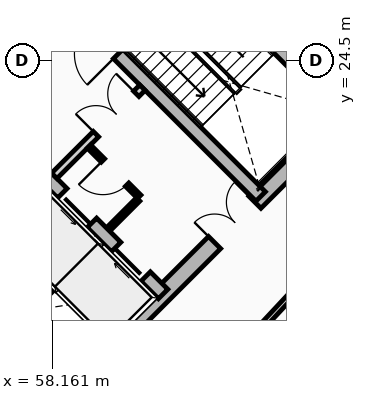
"""IFC4 building model, lengths in metres.
Left out: names, types, materials, properties, quantities, classifications, styles, units other than length and angle.
Written with IfcOpenShell. Run it as: python <this file> out.ifc"""

import sys

from ifc_helpers import new_model, si_unit, direction, frame, frame_2d, origin, place, context, subcontext, project, spatial, rectangle, extrude, source, transform, mapped, element, fill, save


model = new_model("IFC4")
c1 = context("Model", 3, precision=1e-05, world=origin(), true_north=direction((0.0, 1.0)))
c2 = subcontext(c1, "Body", "Model", "MODEL_VIEW")
j1 = project(units=[si_unit("LENGTHUNIT", "METRE"), si_unit("PLANEANGLEUNIT", "RADIAN")], contexts=[c1])
p1 = place(None, origin())
s1 = spatial("IfcSite", under=j1, at=p1, CompositionType="ELEMENT")
p2 = place(p1, origin())
s2 = spatial("IfcBuilding", under=s1, at=p2, CompositionType="ELEMENT")
p3 = place(p2, frame((0.0, 0.0, 125.44)))
s3 = spatial("IfcBuildingStorey", under=s2, at=p3, CompositionType="ELEMENT", Elevation=125.44)
for number, where, z_axis, x_axis in (
    (1, (58.737, 15.697, 0.0), (0.0, 0.0, 1.0), (-0.707, 0.707, 0.0)),
    (2, (66.303, 23.263, 0.0), (0.0, 0.0, 1.0), (-0.707, 0.707, 0.0)),
):
    element("IfcWall", number, at=place(p3, frame(where, z_axis=z_axis, x_axis=x_axis)), inside=s3, PredefinedType="SHEAR", context=c2, shape_type="SweptSolid", body=[
        extrude(rectangle(XDim=14.2, YDim=0.45, at=frame_2d((7.1, 0.0))), origin(), (0.0, 0.0, 1.0), 3.72),
    ])
p4 = place(p3, frame((58.578, 15.856, 0.0), z_axis=(0.0, 0.0, 1.0), x_axis=(0.707106781187, 0.707106781187, 0.0)))
e3 = element("IfcWall", 3, at=p4, inside=s3, PredefinedType="SHEAR", context=c2, shape_type="SweptSolid", body=[
    extrude(rectangle(XDim=10.7, YDim=0.45, at=frame_2d((5.35, 0.0))), origin(), (0.0, 0.0, 1.0), 3.72),
])
m1 = source(origin(), c2, "Body", "SweptSolid", [
    extrude(rectangle(XDim=1.5, YDim=2.02, at=frame_2d((0.75, 1.01))), frame((0.0, 0.235, 0.0), z_axis=(0.0, -1.0, 0.0), x_axis=(1.0, 0.0, 0.0)), (0.0, 0.0, 1.0), 0.47),
])
p5 = place(p4, frame((5.45, 0.0, 0.0)))
e4 = element("IfcOpeningElement", 4, at=p5, cuts=e3, PredefinedType="OPENING", context=c2, shape_type="MappedRepresentation", body=[
    mapped(m1, transform((0.0, 0.0, 0.0), x_axis=(1.0, 0.0, 0.0), y_axis=(0.0, 1.0, 0.0), z_axis=(0.0, 0.0, 1.0), scale=1.0)),
])
p6 = place(p3, frame((61.078, 18.355, 0.0), z_axis=(0.0, 0.0, 1.0), x_axis=(-0.707106781187, 0.707106781187, 0.0)))
e5 = element("IfcWall", 5, at=p6, inside=s3, PredefinedType="SHEAR", context=c2, shape_type="SweptSolid", body=[
    extrude(rectangle(XDim=13.75, YDim=0.35, at=frame_2d((6.875, 0.0))), origin(), (0.0, 0.0, 1.0), 3.72),
])
m2 = source(origin(), c2, "Body", "SweptSolid", [
    extrude(rectangle(XDim=1.1, YDim=2.015, at=frame_2d((0.55, 1.007))), frame((0.0, 0.185, 0.0), z_axis=(0.0, -1.0, 0.0), x_axis=(1.0, 0.0, 0.0)), (0.0, 0.0, 1.0), 0.37),
])
p7 = place(p6, frame((4.875, 0.0, 0.0)))
e6 = element("IfcOpeningElement", 6, at=p7, cuts=e5, PredefinedType="OPENING", context=c2, shape_type="MappedRepresentation", body=[
    mapped(m2, transform((0.0, 0.0, 0.0), x_axis=(1.0, 0.0, 0.0), y_axis=(0.0, 1.0, 0.0), z_axis=(0.0, 0.0, 1.0), scale=1.0)),
])
p8 = place(p6, frame((0.65, 0.0, 0.0)))
e7 = element("IfcOpeningElement", 7, at=p8, cuts=e5, PredefinedType="OPENING", context=c2, shape_type="MappedRepresentation", body=[
    mapped(m2, transform((0.0, 0.0, 0.0), x_axis=(1.0, 0.0, 0.0), y_axis=(0.0, 1.0, 0.0), z_axis=(0.0, 0.0, 1.0), scale=1.0)),
])
p9 = place(p6, frame((2.65, 0.0, 0.0)))
e8 = element("IfcOpeningElement", 8, at=p9, cuts=e5, PredefinedType="OPENING", context=c2, shape_type="MappedRepresentation", body=[
    mapped(m2, transform((0.0, 0.0, 0.0), x_axis=(1.0, 0.0, 0.0), y_axis=(0.0, 1.0, 0.0), z_axis=(0.0, 0.0, 1.0), scale=1.0)),
])
m3 = source(origin(), c2, "Body", "SweptSolid", [
    extrude(rectangle(XDim=1.15, YDim=2.02, at=frame_2d((0.575, 1.01))), frame((0.0, 0.185, 0.0), z_axis=(0.0, -1.0, 0.0), x_axis=(1.0, 0.0, 0.0)), (0.0, 0.0, 1.0), 0.37),
])
p10 = place(p6, frame((7.295, 0.0, 0.0)))
e9 = element("IfcOpeningElement", 9, at=p10, cuts=e5, PredefinedType="OPENING", context=c2, shape_type="MappedRepresentation", body=[
    mapped(m3, transform((0.0, 0.0, 0.0), x_axis=(1.0, 0.0, 0.0), y_axis=(0.0, 1.0, 0.0), z_axis=(0.0, 0.0, 1.0), scale=1.0)),
])
p11 = place(p3, frame((63.645, 20.922, 0.0), z_axis=(0.0, 0.0, 1.0), x_axis=(-0.707106781187, 0.707106781187, 0.0)))
e10 = element("IfcWall", 10, at=p11, inside=s3, PredefinedType="SHEAR", context=c2, shape_type="SweptSolid", body=[
    extrude(rectangle(XDim=13.75, YDim=0.35, at=frame_2d((6.875, 0.0))), origin(), (0.0, 0.0, 1.0), 3.72),
])
p12 = place(p11, frame((10.0, 0.0, 0.0)))
e11 = element("IfcOpeningElement", 11, at=p12, cuts=e10, PredefinedType="OPENING", context=c2, shape_type="MappedRepresentation", body=[
    mapped(m2, transform((0.0, 0.0, 0.0), x_axis=(1.0, 0.0, 0.0), y_axis=(0.0, 1.0, 0.0), z_axis=(0.0, 0.0, 1.0), scale=1.0)),
])
p13 = place(p11, frame((12.0, 0.0, 0.0)))
e12 = element("IfcOpeningElement", 12, at=p13, cuts=e10, PredefinedType="OPENING", context=c2, shape_type="MappedRepresentation", body=[
    mapped(m2, transform((0.0, 0.0, 0.0), x_axis=(1.0, 0.0, 0.0), y_axis=(0.0, 1.0, 0.0), z_axis=(0.0, 0.0, 1.0), scale=1.0)),
])
p14 = place(p11, frame((5.305, 0.0, 0.0)))
e13 = element("IfcOpeningElement", 13, at=p14, cuts=e10, PredefinedType="OPENING", context=c2, shape_type="MappedRepresentation", body=[
    mapped(m3, transform((0.0, 0.0, 0.0), x_axis=(1.0, 0.0, 0.0), y_axis=(0.0, 1.0, 0.0), z_axis=(0.0, 0.0, 1.0), scale=1.0)),
])
p15 = place(p3, frame((65.83, 23.107, 0.0), z_axis=(0.0, 0.0, 1.0), x_axis=(-0.707088616009, 0.707124945897, 0.0)))
e14 = element("IfcWall", 14, at=p15, inside=s3, PredefinedType="SHEAR", context=c2, shape_type="SweptSolid", body=[
    extrude(rectangle(XDim=6.72, YDim=0.35, at=frame_2d((3.36, 0.0))), origin(), (0.0, 0.0, 1.0), 3.72),
])
p16 = place(p3, frame((57.284, 17.673, 0.0), z_axis=(0.0, 0.0, 1.0), x_axis=(0.707147878904, 0.70706568108, 0.0)))
e15 = element("IfcWall", 15, at=p16, inside=s3, PredefinedType="SHEAR", context=c2, shape_type="SweptSolid", body=[
    extrude(rectangle(XDim=2.97, YDim=0.2, at=frame_2d((1.485, 0.0))), origin(), (0.0, 0.0, 1.0), 3.72),
])
p17 = place(p3, frame((58.737, 16.644, 0.0), z_axis=(0.0, 0.0, 1.0), x_axis=(-0.707032117043, 0.707181437447, 0.0)))
e16 = element("IfcWall", 16, at=p17, inside=s3, PredefinedType="SHEAR", context=c2, shape_type="SweptSolid", body=[
    extrude(rectangle(XDim=1.635, YDim=0.2, at=frame_2d((0.817, 0.0))), origin(), (0.0, 0.0, 1.0), 3.72),
])
p18 = place(p3, frame((58.214, 21.467, 0.0), z_axis=(0.0, 0.0, 1.0), x_axis=(0.707106781187, 0.707106781187, 0.0)))
e17 = element("IfcWall", 17, at=p18, inside=s3, PredefinedType="PARTITIONING", context=c2, shape_type="SweptSolid", body=[
    extrude(rectangle(XDim=3.28, YDim=0.2, at=frame_2d((1.64, 0.0))), origin(), (0.0, 0.0, 1.0), 3.425),
])
m4 = source(origin(), c2, "Body", "SweptSolid", [
    extrude(rectangle(XDim=1.5, YDim=2.02, at=frame_2d((0.75, 1.01))), frame((0.0, 0.11, 0.0), z_axis=(0.0, -1.0, 0.0), x_axis=(1.0, 0.0, 0.0)), (0.0, 0.0, 1.0), 0.22),
])
p19 = place(p18, frame((1.55, 0.0, 0.0)))
e18 = element("IfcOpeningElement", 18, at=p19, cuts=e17, PredefinedType="OPENING", context=c2, shape_type="MappedRepresentation", body=[
    mapped(m4, transform((0.0, 0.0, 0.0), x_axis=(1.0, 0.0, 0.0), y_axis=(0.0, 1.0, 0.0), z_axis=(0.0, 0.0, 1.0), scale=1.0)),
])
p20 = place(p3, frame((60.448, 20.915, 0.0), z_axis=(0.0, 0.0, 1.0), x_axis=(-0.707106781187, 0.707106781187, 0.0)))
e19 = element("IfcWall", 19, at=p20, inside=s3, PredefinedType="PARTITIONING", context=c2, shape_type="SweptSolid", body=[
    extrude(rectangle(XDim=1.87, YDim=0.125, at=frame_2d((0.935, 0.0))), origin(), (0.0, 0.0, 1.0), 3.425),
])
m5 = source(origin(), c2, "Body", "SweptSolid", [
    extrude(rectangle(XDim=0.9, YDim=2.005, at=frame_2d((0.45, 1.002))), frame((0.0, 0.073, 0.0), z_axis=(0.0, -1.0, 0.0), x_axis=(1.0, 0.0, 0.0)), (0.0, 0.0, 1.0), 0.145),
])
p21 = place(p20, frame((0.45, 0.0, 0.0)))
e20 = element("IfcOpeningElement", 20, at=p21, cuts=e19, PredefinedType="OPENING", context=c2, shape_type="MappedRepresentation", body=[
    mapped(m5, transform((0.0, 0.0, 0.0), x_axis=(1.0, 0.0, 0.0), y_axis=(0.0, 1.0, 0.0), z_axis=(0.0, 0.0, 1.0), scale=1.0)),
])
p22 = place(p3, frame((59.643, 20.066, 0.0), z_axis=(0.0, 0.0, 1.0), x_axis=(0.707106781187, 0.707106781187, 0.0)))
e21 = element("IfcWall", 21, at=p22, inside=s3, PredefinedType="PARTITIONING", context=c2, shape_type="SweptSolid", body=[
    extrude(rectangle(XDim=1.1, YDim=0.125, at=frame_2d((0.55, 0.0))), origin(), (0.0, 0.0, 1.0), 3.425),
])
p23 = place(p3, frame((62.903, 16.667, 0.0), z_axis=(0.0, 0.0, 1.0), x_axis=(0.682371947497, 0.731005147225, 0.0)))
e22 = element("IfcWall", 22, at=p23, inside=s3, PredefinedType="PARTITIONING", context=c2, shape_type="SweptSolid", body=[
    extrude(rectangle(XDim=6.642, YDim=0.15, at=frame_2d((3.321, 0.0))), origin(), (0.0, 0.0, 1.0), 2.995),
])
m6 = source(origin(), c2, "Body", "SweptSolid", [
    extrude(rectangle(XDim=1.1, YDim=2.015, at=frame_2d((0.55, 1.007))), frame((0.0, 0.025, 0.0), z_axis=(0.0, -1.0, 0.0), x_axis=(1.0, 0.0, 0.0)), (0.0, 0.0, 1.0), 0.05),
])
p24 = place(p8, origin())
e23 = element("IfcDoor", 23, at=p24, inside=s3, OperationType="SLIDING_TO_RIGHT", PredefinedType="DOOR", context=c2, shape_type="MappedRepresentation", body=[
    mapped(m6, transform((0.0, 0.0, 0.0), x_axis=(1.0, 0.0, 0.0), y_axis=(0.0, 1.0, 0.0), z_axis=(0.0, 0.0, 1.0), scale=1.0)),
])
fill(e7, e23)
p25 = place(p9, origin())
e24 = element("IfcDoor", 24, at=p25, inside=s3, OperationType="SLIDING_TO_LEFT", PredefinedType="DOOR", context=c2, shape_type="MappedRepresentation", body=[
    mapped(m6, transform((0.0, 0.0, 0.0), x_axis=(1.0, 0.0, 0.0), y_axis=(0.0, 1.0, 0.0), z_axis=(0.0, 0.0, 1.0), scale=1.0)),
])
fill(e8, e24)
m7 = source(origin(), c2, "Body", "SweptSolid", [
    extrude(rectangle(XDim=1.15, YDim=2.02, at=frame_2d((0.575, 1.01))), frame((0.0, 0.025, 0.0), z_axis=(0.0, -1.0, 0.0), x_axis=(1.0, 0.0, 0.0)), (0.0, 0.0, 1.0), 0.05),
])
p26 = place(p14, origin())
e25 = element("IfcDoor", 25, at=p26, inside=s3, OperationType="SINGLE_SWING_LEFT", PredefinedType="DOOR", context=c2, shape_type="MappedRepresentation", body=[
    mapped(m7, transform((0.0, 0.0, 0.0), x_axis=(1.0, 0.0, 0.0), y_axis=(0.0, 1.0, 0.0), z_axis=(0.0, 0.0, 1.0), scale=1.0)),
])
fill(e13, e25)
m8 = source(origin(), c2, "Body", "SweptSolid", [
    extrude(rectangle(XDim=1.5, YDim=2.02, at=frame_2d((0.75, 1.01))), frame((0.0, 0.025, 0.0), z_axis=(0.0, -1.0, 0.0), x_axis=(1.0, 0.0, 0.0)), (0.0, 0.0, 1.0), 0.05),
])
p27 = place(p5, origin())
e26 = element("IfcDoor", 26, at=p27, inside=s3, OperationType="DOUBLE_DOOR_SINGLE_SWING", PredefinedType="DOOR", context=c2, shape_type="MappedRepresentation", body=[
    mapped(m8, transform((0.0, 0.0, 0.0), x_axis=(1.0, 0.0, 0.0), y_axis=(0.0, 1.0, 0.0), z_axis=(0.0, 0.0, 1.0), scale=1.0)),
])
fill(e4, e26)
p28 = place(p19, origin())
e27 = element("IfcDoor", 27, at=p28, inside=s3, OperationType="DOUBLE_DOOR_SINGLE_SWING", PredefinedType="DOOR", context=c2, shape_type="MappedRepresentation", body=[
    mapped(m8, transform((0.0, 0.0, 0.0), x_axis=(1.0, 0.0, 0.0), y_axis=(0.0, 1.0, 0.0), z_axis=(0.0, 0.0, 1.0), scale=1.0)),
])
fill(e18, e27)
m9 = source(origin(), c2, "Body", "SweptSolid", [
    extrude(rectangle(XDim=0.9, YDim=2.005, at=frame_2d((0.45, 1.002))), frame((0.0, 0.025, 0.0), z_axis=(0.0, -1.0, 0.0), x_axis=(1.0, 0.0, 0.0)), (0.0, 0.0, 1.0), 0.05),
])
p29 = place(p21, origin())
e28 = element("IfcDoor", 28, at=p29, inside=s3, OperationType="SINGLE_SWING_RIGHT", PredefinedType="DOOR", context=c2, shape_type="MappedRepresentation", body=[
    mapped(m9, transform((0.0, 0.0, 0.0), x_axis=(1.0, 0.0, 0.0), y_axis=(0.0, 1.0, 0.0), z_axis=(0.0, 0.0, 1.0), scale=1.0)),
])
fill(e20, e28)
save(model, sys.argv[1])
